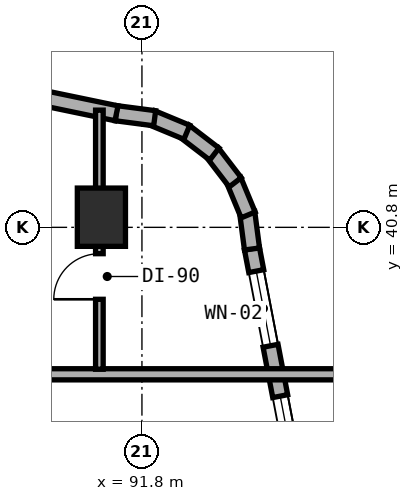
"""IFC4 building model, lengths in metres.
Left out: names, types, materials, properties, quantities, classifications, styles, units other than length and angle.
Written with IfcOpenShell. Run it as: python <this file> out.ifc"""

import sys

from ifc_helpers import new_model, si_unit, direction, frame, frame_2d, origin, origin_2d, place, context, subcontext, project, spatial, rectangle, extrude, element, fill, save


model = new_model("IFC4")
c1 = context("Model", 3, precision=1e-05, world=origin(), true_north=direction((0.0, 1.0)))
c2 = subcontext(c1, "Body", "Model", "MODEL_VIEW")
j1 = project(units=[si_unit("LENGTHUNIT", "METRE"), si_unit("PLANEANGLEUNIT", "RADIAN")], contexts=[c1])
p1 = place(None, origin())
s1 = spatial("IfcSite", under=j1, at=p1, CompositionType="ELEMENT")
p2 = place(p1, origin())
s2 = spatial("IfcBuilding", under=s1, at=p2, CompositionType="ELEMENT")
p3 = place(p2, frame((0.0, 0.0, 62.5)))
s3 = spatial("IfcBuildingStorey", under=s2, at=p3, CompositionType="ELEMENT", Elevation=62.5)
p4 = place(p3, frame((91.0, 41.0, 0.0), z_axis=(0.0, 0.0, 1.0), x_axis=(1.0, 0.0, 0.0)))
e1 = element("IfcColumn", 1, at=p4, inside=s3, PredefinedType="COLUMN", context=c2, shape_type="SweptSolid", body=[
    extrude(rectangle(XDim=0.95, YDim=1.15, at=origin_2d()), origin(), (0.0, 0.0, 1.0), 3.5),
])
p5 = place(p3, frame((95.783, 30.918, 0.0), z_axis=(0.0, 0.0, 1.0), x_axis=(-0.188087874316, 0.982152203854, 0.0)))
e2 = element("IfcWall", 2, at=p5, inside=s3, PredefinedType="STANDARD", context=c2, shape_type="SweptSolid", body=[
    extrude(rectangle(XDim=9.634, YDim=0.3, at=frame_2d((4.817, 0.0))), origin(), (0.0, 0.0, 1.0), 3.25),
])
p6 = place(p5, frame((1.255, 0.0, 0.8)))
e3 = element("IfcOpeningElement", 3, at=p6, cuts=e2, PredefinedType="OPENING", context=c2, shape_type="SweptSolid", body=[
    extrude(rectangle(XDim=2.4, YDim=1.6, at=frame_2d((1.2, 0.8))), frame((0.0, 0.16, 0.0), z_axis=(0.0, -1.0, 0.0), x_axis=(1.0, 0.0, 0.0)), (0.0, 0.0, 1.0), 0.32),
])
p7 = place(p5, frame((5.47, 0.0, 0.85)))
e4 = element("IfcOpeningElement", 4, at=p7, cuts=e2, PredefinedType="OPENING", context=c2, shape_type="SweptSolid", body=[
    extrude(rectangle(XDim=1.2, YDim=1.5, at=frame_2d((0.6, 0.75))), frame((0.0, 0.16, 0.0), z_axis=(0.0, -1.0, 0.0), x_axis=(1.0, 0.0, 0.0)), (0.0, 0.0, 1.0), 0.32),
])
p8 = place(p5, frame((7.682, 0.0, 0.85)))
e5 = element("IfcOpeningElement", 5, at=p8, cuts=e2, PredefinedType="OPENING", context=c2, shape_type="SweptSolid", body=[
    extrude(rectangle(XDim=1.5, YDim=1.5, at=frame_2d((0.75, 0.75))), frame((0.0, 0.16, 0.0), z_axis=(0.0, -1.0, 0.0), x_axis=(1.0, 0.0, 0.0)), (0.0, 0.0, 1.0), 0.32),
])
p9 = place(p3, frame((93.972, 40.373, 0.0), z_axis=(0.0, 0.0, 1.0), x_axis=(-0.130255288807, 0.991480488834, 0.0)))
e6 = element("IfcWall", 6, at=p9, inside=s3, PredefinedType="STANDARD", context=c2, shape_type="SweptSolid", body=[
    extrude(rectangle(XDim=0.729, YDim=0.3, at=frame_2d((0.365, 0.0))), origin(), (0.0, 0.0, 1.0), 3.25),
])
p10 = place(p3, frame((93.896, 41.045, 0.0), z_axis=(0.0, 0.0, 1.0), x_axis=(-0.383267045233, 0.923637576129, 0.0)))
e7 = element("IfcWall", 7, at=p10, inside=s3, PredefinedType="STANDARD", context=c2, shape_type="SweptSolid", body=[
    extrude(rectangle(XDim=0.746, YDim=0.3, at=frame_2d((0.373, 0.0))), origin(), (0.0, 0.0, 1.0), 3.25),
])
for number, where, z_axis, x_axis in (
    (8, (93.641, 41.689, 0.0), (0.0, 0.0, 1.0), (-0.609, 0.793, 0.0)),
    (9, (93.229, 42.246, 0.0), (0.0, 0.0, 1.0), (-0.794, 0.608, 0.0)),
):
    element("IfcWall", number, at=place(p3, frame(where, z_axis=z_axis, x_axis=x_axis)), inside=s3, PredefinedType="STANDARD", context=c2, shape_type="SweptSolid", body=[
        extrude(rectangle(XDim=0.746, YDim=0.3, at=frame_2d((0.373, 0.0))), origin(), (0.0, 0.0, 1.0), 3.25),
    ])
p11 = place(p3, frame((92.686, 42.676, 0.0), z_axis=(0.0, 0.0, 1.0), x_axis=(-0.923637576129, 0.383267045233, 0.0)))
e10 = element("IfcWall", 10, at=p11, inside=s3, PredefinedType="STANDARD", context=c2, shape_type="SweptSolid", body=[
    extrude(rectangle(XDim=0.746, YDim=0.3, at=frame_2d((0.373, 0.0))), origin(), (0.0, 0.0, 1.0), 3.25),
])
p12 = place(p3, frame((92.051, 42.953, 0.0), z_axis=(0.0, 0.0, 1.0), x_axis=(-0.991559404866, 0.129653178221, 0.0)))
e11 = element("IfcWall", 11, at=p12, inside=s3, PredefinedType="STANDARD", context=c2, shape_type="SweptSolid", body=[
    extrude(rectangle(XDim=0.764, YDim=0.3, at=frame_2d((0.382, 0.0))), origin(), (0.0, 0.0, 1.0), 3.25),
])
p13 = place(p3, frame((91.298, 43.051, 0.0), z_axis=(0.0, 0.0, 1.0), x_axis=(-0.979128391325, 0.203242695569, 0.0)))
e12 = element("IfcWall", 12, at=p13, inside=s3, PredefinedType="STANDARD", context=c2, shape_type="SweptSolid", body=[
    extrude(rectangle(XDim=8.92, YDim=0.3, at=frame_2d((4.46, 0.0))), origin(), (0.0, 0.0, 1.0), 3.25),
])
p14 = place(p13, frame((3.472, 0.0, 0.8)))
e13 = element("IfcOpeningElement", 13, at=p14, cuts=e12, PredefinedType="OPENING", context=c2, shape_type="SweptSolid", body=[
    extrude(rectangle(XDim=2.4, YDim=1.6, at=frame_2d((1.2, 0.8))), frame((0.0, 0.16, 0.0), z_axis=(0.0, -1.0, 0.0), x_axis=(1.0, 0.0, 0.0)), (0.0, 0.0, 1.0), 0.32),
])
p15 = place(p3, frame((88.35, 37.9, 0.0), z_axis=(0.0, 0.0, 1.0), x_axis=(1.0, 0.0, 0.0)))
e14 = element("IfcWall", 14, at=p15, inside=s3, PredefinedType="SOLIDWALL", context=c2, shape_type="SweptSolid", body=[
    extrude(rectangle(XDim=7.41, YDim=0.22, at=frame_2d((3.705, 0.0))), origin(), (0.0, 0.0, 1.0), 2.865),
])
p16 = place(p3, frame((90.96, 38.0, 0.0), z_axis=(0.0, 0.0, 1.0), x_axis=(0.0, 1.0, 0.0)))
e15 = element("IfcWall", 15, at=p16, inside=s3, PredefinedType="PARTITIONING", context=c2, shape_type="SweptSolid", body=[
    extrude(rectangle(XDim=5.113, YDim=0.15, at=frame_2d((2.557, 0.0))), origin(), (0.0, 0.0, 1.0), 2.865),
])
p17 = place(p16, frame((1.38, 0.0, 0.0)))
e16 = element("IfcOpeningElement", 16, at=p17, cuts=e15, PredefinedType="OPENING", context=c2, shape_type="SweptSolid", body=[
    extrude(rectangle(XDim=0.9, YDim=2.1, at=frame_2d((0.45, 1.05))), frame((0.0, 0.085, 0.0), z_axis=(0.0, -1.0, 0.0), x_axis=(1.0, 0.0, 0.0)), (0.0, 0.0, 1.0), 0.17),
])
p18 = place(p7, origin())
e17 = element("IfcWindow", 17, at=p18, inside=s3, PartitioningType="SINGLE_PANEL", PredefinedType="WINDOW", context=c2, shape_type="SweptSolid", body=[
    extrude(rectangle(XDim=1.2, YDim=1.5, at=frame_2d((0.6, 0.75))), frame((0.0, 0.03, 0.0), z_axis=(0.0, -1.0, 0.0), x_axis=(1.0, 0.0, 0.0)), (0.0, 0.0, 1.0), 0.06),
])
fill(e4, e17)
p19 = place(p8, origin())
e18 = element("IfcWindow", 18, at=p19, inside=s3, PartitioningType="SINGLE_PANEL", PredefinedType="WINDOW", context=c2, shape_type="SweptSolid", body=[
    extrude(rectangle(XDim=1.5, YDim=1.5, at=frame_2d((0.75, 0.75))), frame((0.0, 0.03, 0.0), z_axis=(0.0, -1.0, 0.0), x_axis=(1.0, 0.0, 0.0)), (0.0, 0.0, 1.0), 0.06),
])
fill(e5, e18)
p20 = place(p17, origin())
e19 = element("IfcDoor", 19, at=p20, inside=s3, OperationType="SINGLE_SWING_LEFT", PredefinedType="DOOR", context=c2, shape_type="SweptSolid", body=[
    extrude(rectangle(XDim=0.9, YDim=2.1, at=frame_2d((0.45, 1.05))), frame((0.0, 0.025, 0.0), z_axis=(0.0, -1.0, 0.0), x_axis=(1.0, 0.0, 0.0)), (0.0, 0.0, 1.0), 0.05),
])
fill(e16, e19)
save(model, sys.argv[1])
